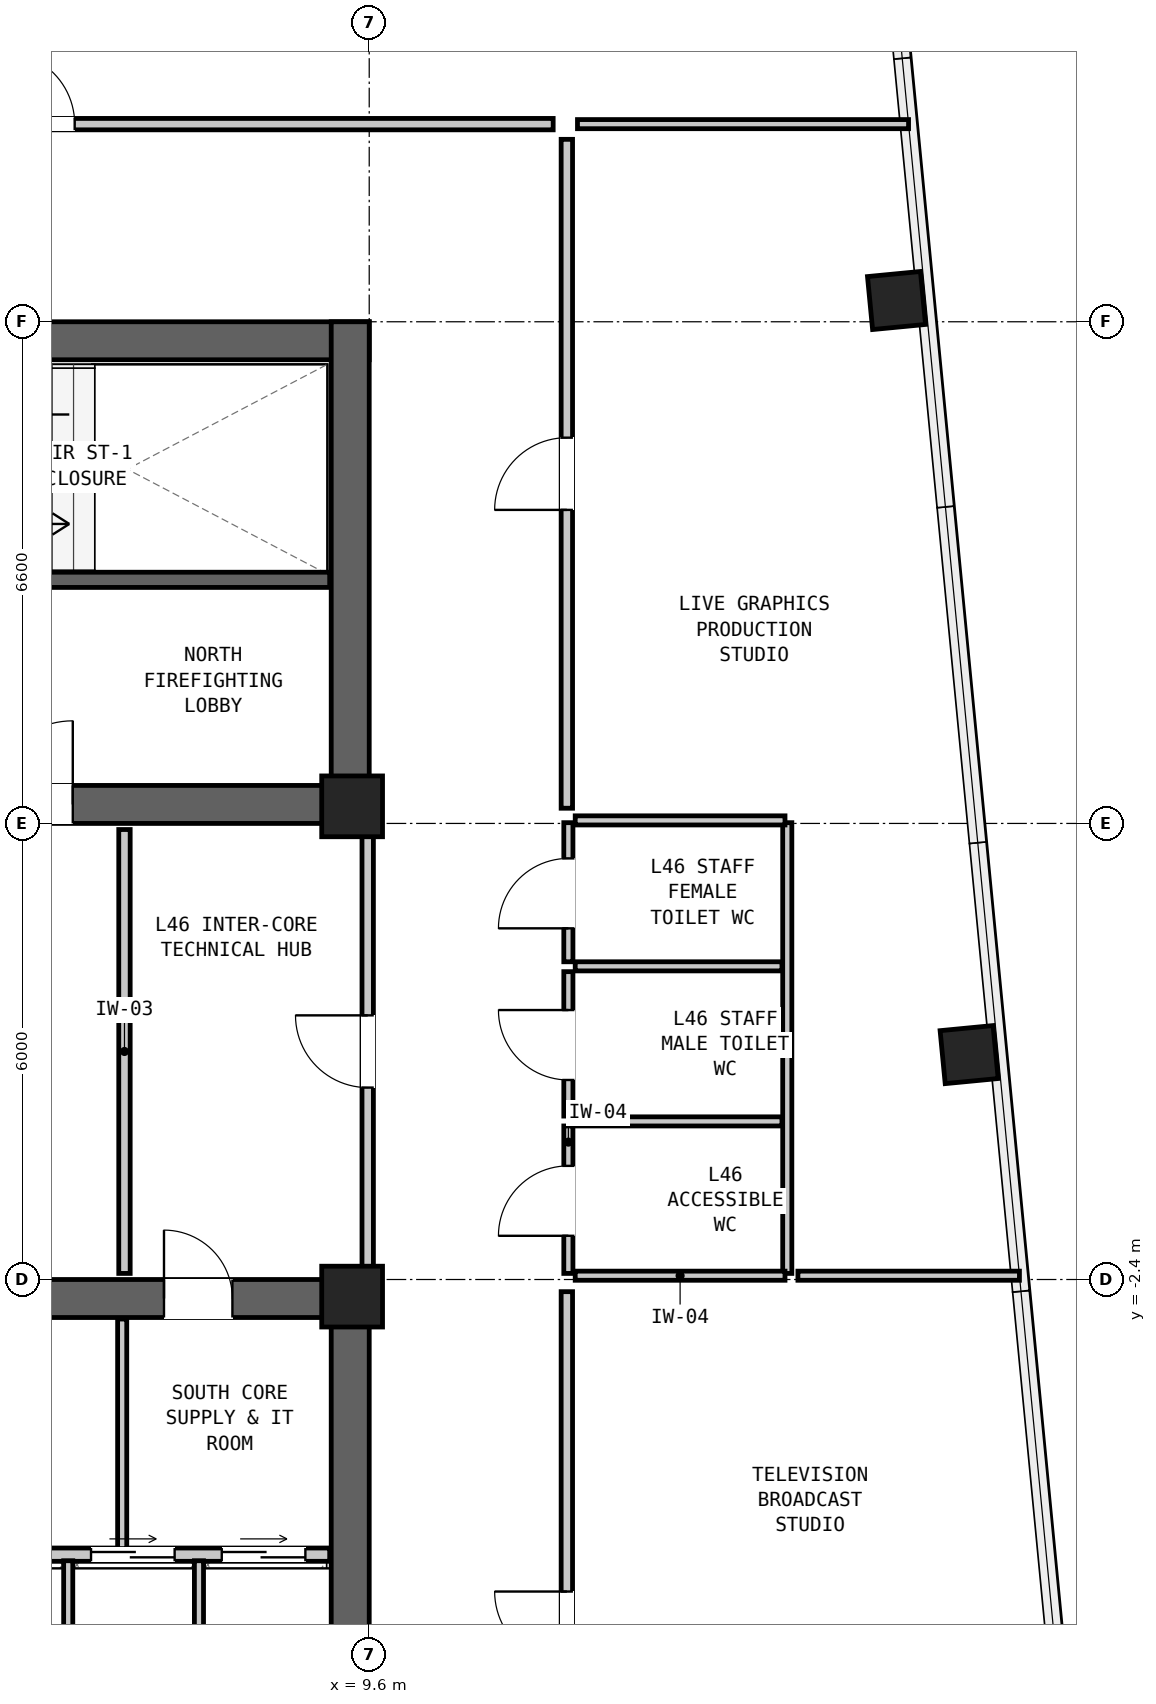
"""IFC4 building model, lengths in metres.
Left out: names, types, materials, properties, quantities, classifications, styles, units other than length and angle.
Written with IfcOpenShell. Run it as: python <this file> out.ifc"""

import sys

from ifc_helpers import new_model, si_unit, direction, frame, frame_2d, origin, origin_2d, place, context, subcontext, project, spatial, rectangle, hollow_rectangle, extrude, element, fill, save


model = new_model("IFC4")
c1 = context("Model", 3, precision=1e-05, world=origin(), true_north=direction((0.0, 1.0)))
c2 = subcontext(c1, "Body", "Model", "MODEL_VIEW")
j1 = project(units=[si_unit("LENGTHUNIT", "METRE"), si_unit("PLANEANGLEUNIT", "RADIAN")], contexts=[c1])
p1 = place(None, origin())
s1 = spatial("IfcSite", under=j1, at=p1, CompositionType="ELEMENT")
p2 = place(p1, origin())
s2 = spatial("IfcBuilding", under=s1, at=p2, CompositionType="ELEMENT")
p3 = place(p2, frame((0.0, 0.0, 159.2)))
s3 = spatial("IfcBuildingStorey", under=s2, at=p3, CompositionType="ELEMENT", Elevation=159.2)
p4 = place(p3, frame((-9.6, 9.95, 0.0), z_axis=(0.0, 0.0, 1.0), x_axis=(1.0, 0.0, 0.0)))
e1 = element("IfcWall", 1, at=p4, inside=s3, PredefinedType="SHEAR", context=c2, shape_type="SweptSolid", body=[
    extrude(rectangle(XDim=19.2, YDim=0.5, at=frame_2d((9.6, 0.0))), origin(), (0.0, 0.0, 1.0), 3.05),
])
p5 = place(p3, frame((-9.6, 3.85, 0.0), z_axis=(0.0, 0.0, 1.0), x_axis=(1.0, 0.0, 0.0)))
e2 = element("IfcWall", 2, at=p5, inside=s3, PredefinedType="SHEAR", context=c2, shape_type="SweptSolid", body=[
    extrude(rectangle(XDim=19.2, YDim=0.5, at=frame_2d((9.6, 0.0))), origin(), (0.0, 0.0, 1.0), 3.05),
])
p6 = place(p5, frame((14.2, 0.0, 0.0)))
e3 = element("IfcOpeningElement", 3, at=p6, cuts=e2, PredefinedType="OPENING", context=c2, shape_type="SweptSolid", body=[
    extrude(rectangle(XDim=1.1, YDim=2.08, at=frame_2d((0.55, 1.04))), frame((0.0, 0.262, 0.0), z_axis=(0.0, -1.0, 0.0), x_axis=(1.0, 0.0, 0.0)), (0.0, 0.0, 1.0), 0.524),
])
p7 = place(p5, frame((8.2, 0.0, 0.0)))
e4 = element("IfcOpeningElement", 4, at=p7, cuts=e2, PredefinedType="OPENING", context=c2, shape_type="SweptSolid", body=[
    extrude(rectangle(XDim=1.15, YDim=2.1, at=frame_2d((0.575, 1.05))), frame((0.0, 0.262, 0.0), z_axis=(0.0, -1.0, 0.0), x_axis=(1.0, 0.0, 0.0)), (0.0, 0.0, 1.0), 0.524),
])
p8 = place(p5, frame((2.5, 0.0, 0.0)))
e5 = element("IfcOpeningElement", 5, at=p8, cuts=e2, PredefinedType="OPENING", context=c2, shape_type="SweptSolid", body=[
    extrude(rectangle(XDim=1.6, YDim=2.12, at=frame_2d((0.8, 1.06))), frame((0.0, 0.262, 0.0), z_axis=(0.0, -1.0, 0.0), x_axis=(1.0, 0.0, 0.0)), (0.0, 0.0, 1.0), 0.524),
])
p9 = place(p3, frame((9.35, 3.6, 0.0), z_axis=(0.0, 0.0, 1.0), x_axis=(0.0, 1.0, 0.0)))
e6 = element("IfcWall", 6, at=p9, inside=s3, PredefinedType="SHEAR", context=c2, shape_type="SweptSolid", body=[
    extrude(rectangle(XDim=6.6, YDim=0.5, at=frame_2d((3.3, 0.0))), origin(), (0.0, 0.0, 1.0), 3.05),
])
p10 = place(p3, frame((-9.6, -2.65, 0.0), z_axis=(0.0, 0.0, 1.0), x_axis=(1.0, 0.0, 0.0)))
e7 = element("IfcWall", 7, at=p10, inside=s3, PredefinedType="SHEAR", context=c2, shape_type="SweptSolid", body=[
    extrude(rectangle(XDim=19.2, YDim=0.5, at=frame_2d((9.6, 0.0))), origin(), (0.0, 0.0, 1.0), 3.05),
])
p11 = place(p10, frame((3.8, 0.0, 0.0)))
e8 = element("IfcOpeningElement", 8, at=p11, cuts=e7, PredefinedType="OPENING", context=c2, shape_type="SweptSolid", body=[
    extrude(rectangle(XDim=1.1, YDim=2.08, at=frame_2d((0.55, 1.04))), frame((0.0, 0.262, 0.0), z_axis=(0.0, -1.0, 0.0), x_axis=(1.0, 0.0, 0.0)), (0.0, 0.0, 1.0), 0.524),
])
p12 = place(p10, frame((12.2, 0.0, 0.0)))
e9 = element("IfcOpeningElement", 9, at=p12, cuts=e7, PredefinedType="OPENING", context=c2, shape_type="SweptSolid", body=[
    extrude(rectangle(XDim=1.6, YDim=2.12, at=frame_2d((0.8, 1.06))), frame((0.0, 0.262, 0.0), z_axis=(0.0, -1.0, 0.0), x_axis=(1.0, 0.0, 0.0)), (0.0, 0.0, 1.0), 0.524),
])
p13 = place(p10, frame((16.5, 0.0, 0.0)))
e10 = element("IfcOpeningElement", 10, at=p13, cuts=e7, PredefinedType="OPENING", context=c2, shape_type="SweptSolid", body=[
    extrude(rectangle(XDim=0.9, YDim=2.05, at=frame_2d((0.45, 1.025))), frame((0.0, 0.262, 0.0), z_axis=(0.0, -1.0, 0.0), x_axis=(1.0, 0.0, 0.0)), (0.0, 0.0, 1.0), 0.524),
])
p14 = place(p3, frame((9.35, -9.0, 0.0), z_axis=(0.0, 0.0, 1.0), x_axis=(0.0, 1.0, 0.0)))
e11 = element("IfcWall", 11, at=p14, inside=s3, PredefinedType="SHEAR", context=c2, shape_type="SweptSolid", body=[
    extrude(rectangle(XDim=6.6, YDim=0.5, at=frame_2d((3.3, 0.0))), origin(), (0.0, 0.0, 1.0), 3.05),
])
for number, where, z_axis, x_axis in (
    (12, (17.493, 0.559, 0.0), (0.0, 0.0, 1.0), (-0.096, 0.995, 0.0)),
    (13, (16.537, 10.479, 0.0), (0.0, 0.0, 1.0), (-0.096, 0.995, 0.0)),
):
    element("IfcColumn", number, at=place(p3, frame(where, z_axis=z_axis, x_axis=x_axis)), inside=s3, PredefinedType="COLUMN", context=c2, shape_type="SweptSolid", body=[
        extrude(hollow_rectangle(XDim=0.7, YDim=0.7, WallThickness=0.045, at=origin_2d()), origin(), (0.0, 0.0, 1.0), 3.05),
    ])
for number, where, z_axis, x_axis in (
    (14, (9.375, 3.825, 0.0), (0.0, 0.0, 1.0), (1.0, 0.0, 0.0)),
    (15, (9.375, -2.625, 0.0), (0.0, 0.0, 1.0), (1.0, 0.0, 0.0)),
):
    element("IfcColumn", number, at=place(p3, frame(where, z_axis=z_axis, x_axis=x_axis)), inside=s3, PredefinedType="COLUMN", context=c2, shape_type="SweptSolid", body=[
        extrude(rectangle(XDim=0.8, YDim=0.8, at=origin_2d()), origin(), (0.0, 0.0, 1.0), 3.05),
    ])
p15 = place(p3, frame((2.36, 6.805, 0.0), z_axis=(0.0, 0.0, 1.0), x_axis=(1.0, 0.0, 0.0)))
e16 = element("IfcWall", 16, at=p15, inside=s3, PredefinedType="SHEAR", context=c2, shape_type="SweptSolid", body=[
    extrude(rectangle(XDim=6.72, YDim=0.2, at=frame_2d((3.36, 0.0))), origin(), (0.0, 0.0, 1.0), 2.83),
])
p16 = place(p15, frame((0.3, 0.0, 0.0)))
e17 = element("IfcOpeningElement", 17, at=p16, cuts=e16, PredefinedType="OPENING", context=c2, shape_type="SweptSolid", body=[
    extrude(rectangle(XDim=1.05, YDim=2.08, at=frame_2d((0.525, 1.04))), frame((0.0, 0.112, 0.0), z_axis=(0.0, -1.0, 0.0), x_axis=(1.0, 0.0, 0.0)), (0.0, 0.0, 1.0), 0.224),
])
p17 = place(p3, frame((0.0, -6.02, 0.0), z_axis=(0.0, 0.0, 1.0), x_axis=(1.0, 0.0, 0.0)))
e18 = element("IfcWall", 18, at=p17, inside=s3, PredefinedType="PARTITIONING", context=c2, shape_type="SweptSolid", body=[
    extrude(rectangle(XDim=9.08, YDim=0.175, at=frame_2d((4.54, 0.0))), origin(), (0.0, 0.0, 1.0), 2.83),
])
p18 = place(p17, frame((0.33, 0.0, 0.0)))
e19 = element("IfcOpeningElement", 19, at=p18, cuts=e18, PredefinedType="OPENING", context=c2, shape_type="SweptSolid", body=[
    extrude(rectangle(XDim=1.1, YDim=2.06, at=frame_2d((0.55, 1.03))), frame((0.0, 0.1, 0.0), z_axis=(0.0, -1.0, 0.0), x_axis=(1.0, 0.0, 0.0)), (0.0, 0.0, 1.0), 0.199),
])
p19 = place(p17, frame((2.3, 0.0, 0.0)))
e20 = element("IfcOpeningElement", 20, at=p19, cuts=e18, PredefinedType="OPENING", context=c2, shape_type="SweptSolid", body=[
    extrude(rectangle(XDim=1.1, YDim=2.06, at=frame_2d((0.55, 1.03))), frame((0.0, 0.1, 0.0), z_axis=(0.0, -1.0, 0.0), x_axis=(1.0, 0.0, 0.0)), (0.0, 0.0, 1.0), 0.199),
])
p20 = place(p17, frame((4.22, 0.0, 0.0)))
e21 = element("IfcOpeningElement", 21, at=p20, cuts=e18, PredefinedType="OPENING", context=c2, shape_type="SweptSolid", body=[
    extrude(rectangle(XDim=1.1, YDim=2.06, at=frame_2d((0.55, 1.03))), frame((0.0, 0.1, 0.0), z_axis=(0.0, -1.0, 0.0), x_axis=(1.0, 0.0, 0.0)), (0.0, 0.0, 1.0), 0.199),
])
p21 = place(p17, frame((5.94, 0.0, 0.0)))
e22 = element("IfcOpeningElement", 22, at=p21, cuts=e18, PredefinedType="OPENING", context=c2, shape_type="SweptSolid", body=[
    extrude(rectangle(XDim=1.1, YDim=2.06, at=frame_2d((0.55, 1.03))), frame((0.0, 0.1, 0.0), z_axis=(0.0, -1.0, 0.0), x_axis=(1.0, 0.0, 0.0)), (0.0, 0.0, 1.0), 0.199),
])
p22 = place(p17, frame((7.66, 0.0, 0.0)))
e23 = element("IfcOpeningElement", 23, at=p22, cuts=e18, PredefinedType="OPENING", context=c2, shape_type="SweptSolid", body=[
    extrude(rectangle(XDim=1.1, YDim=2.06, at=frame_2d((0.55, 1.03))), frame((0.0, 0.1, 0.0), z_axis=(0.0, -1.0, 0.0), x_axis=(1.0, 0.0, 0.0)), (0.0, 0.0, 1.0), 0.199),
])
for number, where, z_axis, x_axis in (
    (24, (5.64, -8.48, 0.0), (0.0, 0.0, 1.0), (0.0, 1.0, 0.0)),
    (25, (7.36, -8.48, 0.0), (0.0, 0.0, 1.0), (0.0, 1.0, 0.0)),
):
    element("IfcWall", number, at=place(p3, frame(where, z_axis=z_axis, x_axis=x_axis)), inside=s3, PredefinedType="PARTITIONING", context=c2, shape_type="SweptSolid", body=[
        extrude(rectangle(XDim=2.38, YDim=0.12, at=frame_2d((1.19, 0.0))), origin(), (0.0, 0.0, 1.0), 2.83),
    ])
p23 = place(p3, frame((6.35, -5.94, 0.0), z_axis=(0.0, 0.0, 1.0), x_axis=(0.0, 1.0, 0.0)))
e26 = element("IfcWall", 26, at=p23, inside=s3, PredefinedType="PARTITIONING", context=c2, shape_type="SweptSolid", body=[
    extrude(rectangle(XDim=3.02, YDim=0.12, at=frame_2d((1.51, 0.0))), origin(), (0.0, 0.0, 1.0), 2.83),
])
p24 = place(p3, frame((6.38, -2.32, 0.0), z_axis=(0.0, 0.0, 1.0), x_axis=(0.0, 1.0, 0.0)))
e27 = element("IfcWall", 27, at=p24, inside=s3, PredefinedType="PARTITIONING", context=c2, shape_type="SweptSolid", body=[
    extrude(rectangle(XDim=5.84, YDim=0.15, at=frame_2d((2.92, 0.0))), origin(), (0.0, 0.0, 1.0), 2.198),
])
p25 = place(p3, frame((9.58, -2.32, 0.0), z_axis=(0.0, 0.0, 1.0), x_axis=(0.0, 1.0, 0.0)))
e28 = element("IfcWall", 28, at=p25, inside=s3, PredefinedType="PARTITIONING", context=c2, shape_type="SweptSolid", body=[
    extrude(rectangle(XDim=5.84, YDim=0.15, at=frame_2d((2.92, 0.0))), origin(), (0.0, 0.0, 1.0), 2.198),
])
p26 = place(p25, frame((2.445, 0.0, 0.0)))
e29 = element("IfcOpeningElement", 29, at=p26, cuts=e28, PredefinedType="OPENING", context=c2, shape_type="SweptSolid", body=[
    extrude(rectangle(XDim=0.95, YDim=2.1, at=frame_2d((0.475, 1.05))), frame((0.0, 0.087, 0.0), z_axis=(0.0, -1.0, 0.0), x_axis=(1.0, 0.0, 0.0)), (0.0, 0.0, 1.0), 0.174),
])
p27 = place(p3, frame((12.22, -2.32, 0.0), z_axis=(0.0, 0.0, 1.0), x_axis=(0.0, 1.0, 0.0)))
e30 = element("IfcWall", 30, at=p27, inside=s3, PredefinedType="PARTITIONING", context=c2, shape_type="SweptSolid", body=[
    extrude(rectangle(XDim=1.94, YDim=0.12, at=frame_2d((0.97, 0.0))), origin(), (0.0, 0.0, 1.0), 2.83),
])
p28 = place(p27, frame((0.495, 0.0, 0.0)))
e31 = element("IfcOpeningElement", 31, at=p28, cuts=e30, PredefinedType="OPENING", context=c2, shape_type="SweptSolid", body=[
    extrude(rectangle(XDim=0.92, YDim=2.1, at=frame_2d((0.46, 1.05))), frame((0.0, 0.072, 0.0), z_axis=(0.0, -1.0, 0.0), x_axis=(1.0, 0.0, 0.0)), (0.0, 0.0, 1.0), 0.144),
])
p29 = place(p3, frame((12.22, -0.25, 0.0), z_axis=(0.0, 0.0, 1.0), x_axis=(0.0, 1.0, 0.0)))
e32 = element("IfcWall", 32, at=p29, inside=s3, PredefinedType="PARTITIONING", context=c2, shape_type="SweptSolid", body=[
    extrude(rectangle(XDim=1.9, YDim=0.12, at=frame_2d((0.95, 0.0))), origin(), (0.0, 0.0, 1.0), 2.83),
])
p30 = place(p29, frame((0.475, 0.0, 0.0)))
e33 = element("IfcOpeningElement", 33, at=p30, cuts=e32, PredefinedType="OPENING", context=c2, shape_type="SweptSolid", body=[
    extrude(rectangle(XDim=0.92, YDim=2.1, at=frame_2d((0.46, 1.05))), frame((0.0, 0.072, 0.0), z_axis=(0.0, -1.0, 0.0), x_axis=(1.0, 0.0, 0.0)), (0.0, 0.0, 1.0), 0.144),
])
p31 = place(p3, frame((12.22, 1.78, 0.0), z_axis=(0.0, 0.0, 1.0), x_axis=(0.0, 1.0, 0.0)))
e34 = element("IfcWall", 34, at=p31, inside=s3, PredefinedType="PARTITIONING", context=c2, shape_type="SweptSolid", body=[
    extrude(rectangle(XDim=1.83, YDim=0.12, at=frame_2d((0.915, 0.0))), origin(), (0.0, 0.0, 1.0), 2.83),
])
p32 = place(p31, frame((0.44, 0.0, 0.0)))
e35 = element("IfcOpeningElement", 35, at=p32, cuts=e34, PredefinedType="OPENING", context=c2, shape_type="SweptSolid", body=[
    extrude(rectangle(XDim=0.92, YDim=2.1, at=frame_2d((0.46, 1.05))), frame((0.0, 0.072, 0.0), z_axis=(0.0, -1.0, 0.0), x_axis=(1.0, 0.0, 0.0)), (0.0, 0.0, 1.0), 0.144),
])
p33 = place(p3, frame((15.1, -2.32, 0.0), z_axis=(0.0, 0.0, 1.0), x_axis=(0.0, 1.0, 0.0)))
e36 = element("IfcWall", 36, at=p33, inside=s3, PredefinedType="PARTITIONING", context=c2, shape_type="SweptSolid", body=[
    extrude(rectangle(XDim=5.93, YDim=0.12, at=frame_2d((2.965, 0.0))), origin(), (0.0, 0.0, 1.0), 2.83),
])
for number, where, z_axis, x_axis in (
    (37, (12.31, -2.35, 0.0), (0.0, 0.0, 1.0), (1.0, 0.0, 0.0)),
    (38, (12.31, 3.64, 0.0), (0.0, 0.0, 1.0), (1.0, 0.0, 0.0)),
):
    element("IfcWall", number, at=place(p3, frame(where, z_axis=z_axis, x_axis=x_axis)), inside=s3, PredefinedType="PARTITIONING", context=c2, shape_type="SweptSolid", body=[
        extrude(rectangle(XDim=2.76, YDim=0.12, at=frame_2d((1.38, 0.0))), origin(), (0.0, 0.0, 1.0), 1.883),
    ])
for number, where, z_axis, x_axis in (
    (39, (12.31, -0.32, 0.0), (0.0, 0.0, 1.0), (1.0, 0.0, 0.0)),
    (40, (12.31, 1.72, 0.0), (0.0, 0.0, 1.0), (1.0, 0.0, 0.0)),
):
    element("IfcWall", number, at=place(p3, frame(where, z_axis=z_axis, x_axis=x_axis)), inside=s3, PredefinedType="PARTITIONING", context=c2, shape_type="SweptSolid", body=[
        extrude(rectangle(XDim=2.72, YDim=0.12, at=frame_2d((1.36, 0.0))), origin(), (0.0, 0.0, 1.0), 2.83),
    ])
p34 = place(p3, frame((12.34, 12.8, 0.0), z_axis=(0.0, 0.0, 1.0), x_axis=(1.0, 0.0, 0.0)))
e41 = element("IfcWall", 41, at=p34, inside=s3, PredefinedType="PARTITIONING", context=c2, shape_type="SweptSolid", body=[
    extrude(rectangle(XDim=4.355, YDim=0.12, at=frame_2d((2.178, 0.0))), origin(), (0.0, 0.0, 1.0), 2.83),
])
p35 = place(p3, frame((15.24, -2.35, 0.0), z_axis=(0.0, 0.0, 1.0), x_axis=(1.0, 0.0, 0.0)))
e42 = element("IfcWall", 42, at=p35, inside=s3, PredefinedType="PARTITIONING", context=c2, shape_type="SweptSolid", body=[
    extrude(rectangle(XDim=2.914, YDim=0.12, at=frame_2d((1.457, 0.0))), origin(), (0.0, 0.0, 1.0), 1.883),
])
p36 = place(p3, frame((-1.52, 12.8, 0.0), z_axis=(0.0, 0.0, 1.0), x_axis=(1.0, 0.0, 0.0)))
e43 = element("IfcWall", 43, at=p36, inside=s3, PredefinedType="PARTITIONING", context=c2, shape_type="SweptSolid", body=[
    extrude(rectangle(XDim=13.54, YDim=0.15, at=frame_2d((6.77, 0.0))), origin(), (0.0, 0.0, 1.0), 2.83),
])
p37 = place(p36, frame((6.295, 0.0, 0.0)))
e44 = element("IfcOpeningElement", 44, at=p37, cuts=e43, PredefinedType="OPENING", context=c2, shape_type="SweptSolid", body=[
    extrude(rectangle(XDim=0.95, YDim=2.1, at=frame_2d((0.475, 1.05))), frame((0.0, 0.087, 0.0), z_axis=(0.0, -1.0, 0.0), x_axis=(1.0, 0.0, 0.0)), (0.0, 0.0, 1.0), 0.174),
])
p38 = place(p3, frame((12.2, -11.4, 0.0), z_axis=(0.0, 0.0, 1.0), x_axis=(0.0, 1.0, 0.0)))
e45 = element("IfcWall", 45, at=p38, inside=s3, PredefinedType="PARTITIONING", context=c2, shape_type="SweptSolid", body=[
    extrude(rectangle(XDim=8.84, YDim=0.15, at=frame_2d((4.42, 0.0))), origin(), (0.0, 0.0, 1.0), 2.83),
])
p39 = place(p38, frame((3.945, 0.0, 0.0)))
e46 = element("IfcOpeningElement", 46, at=p39, cuts=e45, PredefinedType="OPENING", context=c2, shape_type="SweptSolid", body=[
    extrude(rectangle(XDim=0.95, YDim=2.1, at=frame_2d((0.475, 1.05))), frame((0.0, 0.087, 0.0), z_axis=(0.0, -1.0, 0.0), x_axis=(1.0, 0.0, 0.0)), (0.0, 0.0, 1.0), 0.174),
])
p40 = place(p3, frame((12.2, 3.8, 0.0), z_axis=(0.0, 0.0, 1.0), x_axis=(0.0, 1.0, 0.0)))
e47 = element("IfcWall", 47, at=p40, inside=s3, PredefinedType="PARTITIONING", context=c2, shape_type="SweptSolid", body=[
    extrude(rectangle(XDim=8.8, YDim=0.15, at=frame_2d((4.4, 0.0))), origin(), (0.0, 0.0, 1.0), 2.83),
])
p41 = place(p40, frame((3.925, 0.0, 0.0)))
e48 = element("IfcOpeningElement", 48, at=p41, cuts=e47, PredefinedType="OPENING", context=c2, shape_type="SweptSolid", body=[
    extrude(rectangle(XDim=0.95, YDim=2.1, at=frame_2d((0.475, 1.05))), frame((0.0, 0.087, 0.0), z_axis=(0.0, -1.0, 0.0), x_axis=(1.0, 0.0, 0.0)), (0.0, 0.0, 1.0), 0.174),
])
p42 = place(p6, origin())
e49 = element("IfcDoor", 49, at=p42, inside=s3, OperationType="SINGLE_SWING_RIGHT", PredefinedType="DOOR", context=c2, shape_type="SweptSolid", body=[
    extrude(rectangle(XDim=1.1, YDim=2.08, at=frame_2d((0.55, 1.04))), frame((0.0, 0.025, 0.0), z_axis=(0.0, -1.0, 0.0), x_axis=(1.0, 0.0, 0.0)), (0.0, 0.0, 1.0), 0.05),
])
fill(e3, e49)
p43 = place(p13, origin())
e50 = element("IfcDoor", 50, at=p43, inside=s3, OperationType="SINGLE_SWING_LEFT", PredefinedType="DOOR", context=c2, shape_type="SweptSolid", body=[
    extrude(rectangle(XDim=0.9, YDim=2.05, at=frame_2d((0.45, 1.025))), frame((0.0, 0.025, 0.0), z_axis=(0.0, -1.0, 0.0), x_axis=(1.0, 0.0, 0.0)), (0.0, 0.0, 1.0), 0.05),
])
fill(e10, e50)
p44 = place(p26, origin())
e51 = element("IfcDoor", 51, at=p44, inside=s3, OperationType="SINGLE_SWING_RIGHT", PredefinedType="DOOR", context=c2, shape_type="SweptSolid", body=[
    extrude(rectangle(XDim=0.95, YDim=2.1, at=frame_2d((0.475, 1.05))), frame((0.0, 0.025, 0.0), z_axis=(0.0, -1.0, 0.0), x_axis=(1.0, 0.0, 0.0)), (0.0, 0.0, 1.0), 0.05),
])
fill(e29, e51)
p45 = place(p28, origin())
e52 = element("IfcDoor", 52, at=p45, inside=s3, OperationType="SINGLE_SWING_LEFT", PredefinedType="DOOR", context=c2, shape_type="SweptSolid", body=[
    extrude(rectangle(XDim=0.92, YDim=2.1, at=frame_2d((0.46, 1.05))), frame((0.0, 0.025, 0.0), z_axis=(0.0, -1.0, 0.0), x_axis=(1.0, 0.0, 0.0)), (0.0, 0.0, 1.0), 0.05),
])
fill(e31, e52)
p46 = place(p30, origin())
e53 = element("IfcDoor", 53, at=p46, inside=s3, OperationType="SINGLE_SWING_RIGHT", PredefinedType="DOOR", context=c2, shape_type="SweptSolid", body=[
    extrude(rectangle(XDim=0.92, YDim=2.1, at=frame_2d((0.46, 1.05))), frame((0.0, 0.025, 0.0), z_axis=(0.0, -1.0, 0.0), x_axis=(1.0, 0.0, 0.0)), (0.0, 0.0, 1.0), 0.05),
])
fill(e33, e53)
p47 = place(p32, origin())
e54 = element("IfcDoor", 54, at=p47, inside=s3, OperationType="SINGLE_SWING_LEFT", PredefinedType="DOOR", context=c2, shape_type="SweptSolid", body=[
    extrude(rectangle(XDim=0.92, YDim=2.1, at=frame_2d((0.46, 1.05))), frame((0.0, 0.025, 0.0), z_axis=(0.0, -1.0, 0.0), x_axis=(1.0, 0.0, 0.0)), (0.0, 0.0, 1.0), 0.05),
])
fill(e35, e54)
p48 = place(p37, origin())
e55 = element("IfcDoor", 55, at=p48, inside=s3, OperationType="SINGLE_SWING_LEFT", PredefinedType="DOOR", context=c2, shape_type="SweptSolid", body=[
    extrude(rectangle(XDim=0.95, YDim=2.1, at=frame_2d((0.475, 1.05))), frame((0.0, 0.025, 0.0), z_axis=(0.0, -1.0, 0.0), x_axis=(1.0, 0.0, 0.0)), (0.0, 0.0, 1.0), 0.05),
])
fill(e44, e55)
p49 = place(p39, origin())
e56 = element("IfcDoor", 56, at=p49, inside=s3, OperationType="SINGLE_SWING_RIGHT", PredefinedType="DOOR", context=c2, shape_type="SweptSolid", body=[
    extrude(rectangle(XDim=0.95, YDim=2.1, at=frame_2d((0.475, 1.05))), frame((0.0, 0.025, 0.0), z_axis=(0.0, -1.0, 0.0), x_axis=(1.0, 0.0, 0.0)), (0.0, 0.0, 1.0), 0.05),
])
fill(e46, e56)
p50 = place(p41, origin())
e57 = element("IfcDoor", 57, at=p50, inside=s3, OperationType="SINGLE_SWING_LEFT", PredefinedType="DOOR", context=c2, shape_type="SweptSolid", body=[
    extrude(rectangle(XDim=0.95, YDim=2.1, at=frame_2d((0.475, 1.05))), frame((0.0, 0.025, 0.0), z_axis=(0.0, -1.0, 0.0), x_axis=(1.0, 0.0, 0.0)), (0.0, 0.0, 1.0), 0.05),
])
fill(e48, e57)
p51 = place(p21, origin())
e58 = element("IfcDoor", 58, at=p51, inside=s3, OperationType="DOUBLE_DOOR_SLIDING", PredefinedType="DOOR", context=c2, shape_type="SweptSolid", body=[
    extrude(rectangle(XDim=1.1, YDim=2.06, at=frame_2d((0.55, 1.03))), frame((0.0, 0.025, 0.0), z_axis=(0.0, -1.0, 0.0), x_axis=(1.0, 0.0, 0.0)), (0.0, 0.0, 1.0), 0.05),
])
fill(e22, e58)
p52 = place(p22, origin())
e59 = element("IfcDoor", 59, at=p52, inside=s3, OperationType="DOUBLE_DOOR_SLIDING", PredefinedType="DOOR", context=c2, shape_type="SweptSolid", body=[
    extrude(rectangle(XDim=1.1, YDim=2.06, at=frame_2d((0.55, 1.03))), frame((0.0, 0.025, 0.0), z_axis=(0.0, -1.0, 0.0), x_axis=(1.0, 0.0, 0.0)), (0.0, 0.0, 1.0), 0.05),
])
fill(e23, e59)
save(model, sys.argv[1])
